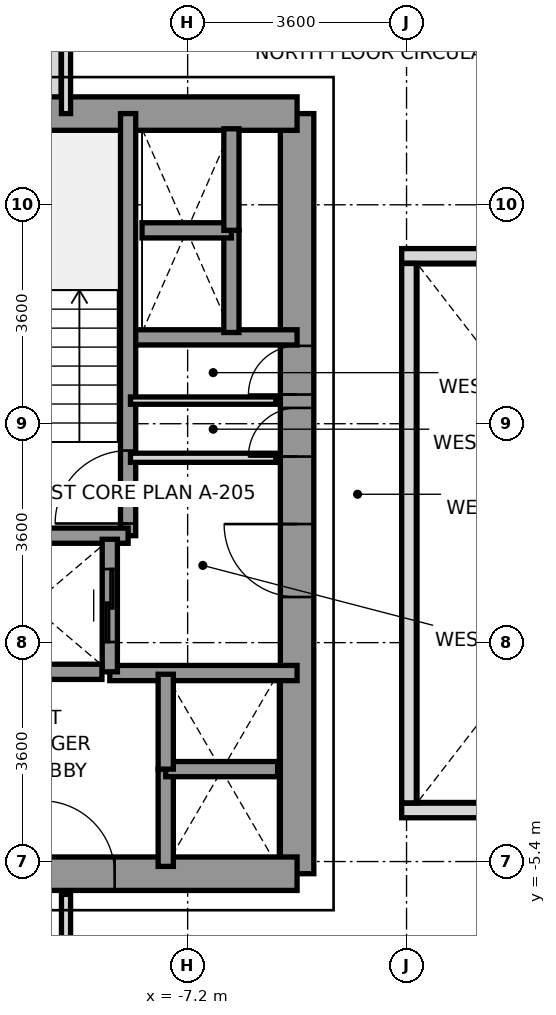
"""IFC4 building model, lengths in metres.
Left out: names, types, materials, properties, quantities, classifications, styles, units other than length and angle.
Written with IfcOpenShell. Run it as: python <this file> out.ifc"""

import sys

from ifc_helpers import new_model, si_unit, direction, frame, frame_2d, origin, place, context, subcontext, project, spatial, rectangle, extrude, source, transform, mapped, element, fill, save


model = new_model("IFC4")
c1 = context("Model", 3, precision=1e-05, world=origin(), true_north=direction((0.0, 1.0)))
c2 = subcontext(c1, "Body", "Model", "MODEL_VIEW")
j1 = project(units=[si_unit("LENGTHUNIT", "METRE"), si_unit("PLANEANGLEUNIT", "RADIAN")], contexts=[c1])
p1 = place(None, origin())
s1 = spatial("IfcSite", under=j1, at=p1, CompositionType="ELEMENT")
p2 = place(p1, origin())
s2 = spatial("IfcBuilding", under=s1, at=p2, CompositionType="ELEMENT")
p3 = place(p2, frame((0.0, 0.0, 40.8)))
s3 = spatial("IfcBuildingStorey", under=s2, at=p3, CompositionType="ELEMENT", Elevation=40.8)
p4 = place(p3, frame((-9.4, 6.953, 0.0), z_axis=(0.0, 0.0, 1.0), x_axis=(0.0, 1.0, 0.0)))
e1 = element("IfcWall", 1, at=p4, inside=s3, PredefinedType="PARAPET", context=c2, shape_type="SweptSolid", body=[
    extrude(rectangle(XDim=1.444, YDim=0.24, at=frame_2d((0.722, 0.0))), origin(), (0.0, 0.0, 1.0), 1.15),
])
p5 = place(p3, frame((-5.4, -5.6, 0.0), z_axis=(0.0, 0.0, 1.0), x_axis=(0.0, 1.0, 0.0)))
e2 = element("IfcWall", 2, at=p5, inside=s3, PredefinedType="SHEAR", context=c2, shape_type="SweptSolid", body=[
    extrude(rectangle(XDim=12.5, YDim=0.55, at=frame_2d((6.25, 0.0))), origin(), (0.0, 0.0, 1.0), 3.2),
])
p6 = place(p5, frame((4.55, 0.0, 0.0)))
e3 = element("IfcOpeningElement", 3, at=p6, cuts=e2, PredefinedType="OPENING", context=c2, shape_type="SweptSolid", body=[
    extrude(rectangle(XDim=1.2, YDim=2.2, at=frame_2d((0.6, 1.1))), frame((0.0, 0.285, 0.0), z_axis=(0.0, -1.0, 0.0), x_axis=(1.0, 0.0, 0.0)), (0.0, 0.0, 1.0), 0.57),
])
p7 = place(p5, frame((6.86, 0.0, 0.0)))
e4 = element("IfcOpeningElement", 4, at=p7, cuts=e2, PredefinedType="OPENING", context=c2, shape_type="SweptSolid", body=[
    extrude(rectangle(XDim=0.8, YDim=2.1, at=frame_2d((0.4, 1.05))), frame((0.0, 0.285, 0.0), z_axis=(0.0, -1.0, 0.0), x_axis=(1.0, 0.0, 0.0)), (0.0, 0.0, 1.0), 0.57),
])
p8 = place(p5, frame((7.88, 0.0, 0.0)))
e5 = element("IfcOpeningElement", 5, at=p8, cuts=e2, PredefinedType="OPENING", context=c2, shape_type="SweptSolid", body=[
    extrude(rectangle(XDim=0.8, YDim=2.1, at=frame_2d((0.4, 1.05))), frame((0.0, 0.285, 0.0), z_axis=(0.0, -1.0, 0.0), x_axis=(1.0, 0.0, 0.0)), (0.0, 0.0, 1.0), 0.57),
])
p9 = place(p3, frame((-11.381, 6.9, 0.0), z_axis=(0.0, 0.0, 1.0), x_axis=(1.0, 0.0, 0.0)))
e6 = element("IfcWall", 6, at=p9, inside=s3, PredefinedType="SHEAR", context=c2, shape_type="SweptSolid", body=[
    extrude(rectangle(XDim=5.981, YDim=0.55, at=frame_2d((2.991, 0.0))), origin(), (0.0, 0.0, 1.0), 3.2),
])
p10 = place(p3, frame((-13.2, -5.6, 0.0), z_axis=(0.0, 0.0, 1.0), x_axis=(1.0, 0.0, 0.0)))
e7 = element("IfcWall", 7, at=p10, inside=s3, PredefinedType="SHEAR", context=c2, shape_type="SweptSolid", body=[
    extrude(rectangle(XDim=7.8, YDim=0.55, at=frame_2d((3.9, 0.0))), origin(), (0.0, 0.0, 1.0), 3.2),
])
p11 = place(p10, frame((3.6, 0.0, 0.0)))
e8 = element("IfcOpeningElement", 8, at=p11, cuts=e7, PredefinedType="OPENING", context=c2, shape_type="SweptSolid", body=[
    extrude(rectangle(XDim=1.2, YDim=2.2, at=frame_2d((0.6, 1.1))), frame((0.0, 0.285, 0.0), z_axis=(0.0, -1.0, 0.0), x_axis=(1.0, 0.0, 0.0)), (0.0, 0.0, 1.0), 0.57),
])
p12 = place(p3, frame((-8.18, 3.22, 0.0), z_axis=(0.0, 0.0, 1.0), x_axis=(1.0, 0.0, 0.0)))
e9 = element("IfcWall", 9, at=p12, inside=s3, PredefinedType="SOLIDWALL", context=c2, shape_type="SweptSolid", body=[
    extrude(rectangle(XDim=2.78, YDim=0.25, at=frame_2d((1.39, 0.0))), origin(), (0.0, 0.0, 1.0), 3.2),
])
p13 = place(p3, frame((-8.48, -2.3, 0.0), z_axis=(0.0, 0.0, 1.0), x_axis=(1.0, 0.0, 0.0)))
e10 = element("IfcWall", 10, at=p13, inside=s3, PredefinedType="SOLIDWALL", context=c2, shape_type="SweptSolid", body=[
    extrude(rectangle(XDim=3.08, YDim=0.25, at=frame_2d((1.54, 0.0))), origin(), (0.0, 0.0, 1.0), 3.2),
])
p14 = place(p3, frame((-8.179, -0.041, 0.0), z_axis=(0.0, 0.0, 1.0), x_axis=(0.0, 1.0, 0.0)))
e11 = element("IfcWall", 11, at=p14, inside=s3, PredefinedType="SOLIDWALL", context=c2, shape_type="SweptSolid", body=[
    extrude(rectangle(XDim=6.941, YDim=0.25, at=frame_2d((3.47, 0.0))), origin(), (0.0, 0.0, 1.0), 3.2),
])
p15 = place(p14, frame((0.2, 0.0, 0.0)))
e12 = element("IfcOpeningElement", 12, at=p15, cuts=e11, PredefinedType="OPENING", context=c2, shape_type="SweptSolid", body=[
    extrude(rectangle(XDim=1.2, YDim=2.2, at=frame_2d((0.6, 1.1))), frame((0.0, 0.135, 0.0), z_axis=(0.0, -1.0, 0.0), x_axis=(1.0, 0.0, 0.0)), (0.0, 0.0, 1.0), 0.27),
])
p16 = place(p3, frame((-11.381, -0.041, 0.0), z_axis=(0.0, 0.0, 1.0), x_axis=(1.0, 0.0, 0.0)))
e13 = element("IfcWall", 13, at=p16, inside=s3, PredefinedType="SOLIDWALL", context=c2, shape_type="SweptSolid", body=[
    extrude(rectangle(XDim=3.202, YDim=0.25, at=frame_2d((1.601, 0.0))), origin(), (0.0, 0.0, 1.0), 3.2),
])
p17 = place(p3, frame((-8.48, -2.28, 0.0), z_axis=(0.0, 0.0, 1.0), x_axis=(0.0, 1.0, 0.0)))
e14 = element("IfcWall", 14, at=p17, inside=s3, PredefinedType="SOLIDWALL", context=c2, shape_type="SweptSolid", body=[
    extrude(rectangle(XDim=2.18, YDim=0.25, at=frame_2d((1.09, 0.0))), origin(), (0.0, 0.0, 1.0), 3.2),
])
p18 = place(p17, frame((0.49, 0.0, 0.0)))
e15 = element("IfcOpeningElement", 15, at=p18, cuts=e14, PredefinedType="OPENING", context=c2, shape_type="SweptSolid", body=[
    extrude(rectangle(XDim=1.2, YDim=2.2, at=frame_2d((0.6, 1.1))), frame((0.0, 0.135, 0.0), z_axis=(0.0, -1.0, 0.0), x_axis=(1.0, 0.0, 0.0)), (0.0, 0.0, 1.0), 0.27),
])
p19 = place(p3, frame((-10.921, -2.28, 0.0), z_axis=(0.0, 0.0, 1.0), x_axis=(1.0, 0.0, 0.0)))
e16 = element("IfcWall", 16, at=p19, inside=s3, PredefinedType="SOLIDWALL", context=c2, shape_type="SweptSolid", body=[
    extrude(rectangle(XDim=2.312, YDim=0.25, at=frame_2d((1.156, 0.0))), origin(), (0.0, 0.0, 1.0), 3.2),
])
p20 = place(p3, frame((-7.56, -5.48, 0.0), z_axis=(0.0, 0.0, 1.0), x_axis=(0.0, 1.0, 0.0)))
e17 = element("IfcWall", 17, at=p20, inside=s3, PredefinedType="SOLIDWALL", context=c2, shape_type="SweptSolid", body=[
    extrude(rectangle(XDim=1.6, YDim=0.25, at=frame_2d((0.8, 0.0))), origin(), (0.0, 0.0, 1.0), 3.2),
])
p21 = place(p3, frame((-7.56, -3.88, 0.0), z_axis=(0.0, 0.0, 1.0), x_axis=(1.0, 0.0, 0.0)))
e18 = element("IfcWall", 18, at=p21, inside=s3, PredefinedType="SOLIDWALL", context=c2, shape_type="SweptSolid", body=[
    extrude(rectangle(XDim=1.84, YDim=0.25, at=frame_2d((0.92, 0.0))), origin(), (0.0, 0.0, 1.0), 3.2),
])
p22 = place(p3, frame((-7.56, -3.88, 0.0), z_axis=(0.0, 0.0, 1.0), x_axis=(0.0, 1.0, 0.0)))
e19 = element("IfcWall", 19, at=p22, inside=s3, PredefinedType="SOLIDWALL", context=c2, shape_type="SweptSolid", body=[
    extrude(rectangle(XDim=1.56, YDim=0.25, at=frame_2d((0.78, 0.0))), origin(), (0.0, 0.0, 1.0), 3.2),
])
p23 = place(p3, frame((-6.48, 3.3, 0.0), z_axis=(0.0, 0.0, 1.0), x_axis=(0.0, 1.0, 0.0)))
e20 = element("IfcWall", 20, at=p23, inside=s3, PredefinedType="SOLIDWALL", context=c2, shape_type="SweptSolid", body=[
    extrude(rectangle(XDim=1.68, YDim=0.25, at=frame_2d((0.84, 0.0))), origin(), (0.0, 0.0, 1.0), 3.2),
])
p24 = place(p3, frame((-7.95, 4.98, 0.0), z_axis=(0.0, 0.0, 1.0), x_axis=(1.0, 0.0, 0.0)))
e21 = element("IfcWall", 21, at=p24, inside=s3, PredefinedType="SOLIDWALL", context=c2, shape_type="SweptSolid", body=[
    extrude(rectangle(XDim=1.47, YDim=0.25, at=frame_2d((0.735, 0.0))), origin(), (0.0, 0.0, 1.0), 3.2),
])
p25 = place(p3, frame((-6.48, 4.98, 0.0), z_axis=(0.0, 0.0, 1.0), x_axis=(0.0, 1.0, 0.0)))
e22 = element("IfcWall", 22, at=p25, inside=s3, PredefinedType="SOLIDWALL", context=c2, shape_type="SweptSolid", body=[
    extrude(rectangle(XDim=1.67, YDim=0.25, at=frame_2d((0.835, 0.0))), origin(), (0.0, 0.0, 1.0), 3.2),
])
p26 = place(p3, frame((-8.14, 1.24, 0.0), z_axis=(0.0, 0.0, 1.0), x_axis=(1.0, 0.0, 0.0)))
e23 = element("IfcWall", 23, at=p26, inside=s3, PredefinedType="PARTITIONING", context=c2, shape_type="SweptSolid", body=[
    extrude(rectangle(XDim=2.39, YDim=0.15, at=frame_2d((1.195, 0.0))), origin(), (0.0, 0.0, 1.0), 2.3),
])
p27 = place(p3, frame((-8.14, 2.18, 0.0), z_axis=(0.0, 0.0, 1.0), x_axis=(1.0, 0.0, 0.0)))
e24 = element("IfcWall", 24, at=p27, inside=s3, PredefinedType="PARTITIONING", context=c2, shape_type="SweptSolid", body=[
    extrude(rectangle(XDim=2.39, YDim=0.12, at=frame_2d((1.195, 0.0))), origin(), (0.0, 0.0, 1.0), 2.3),
])
p28 = place(p3, frame((-9.2, 6.9, 0.0), z_axis=(0.0, 0.0, 1.0), x_axis=(0.0, 1.0, 0.0)))
e25 = element("IfcWall", 25, at=p28, inside=s3, PredefinedType="PARTITIONING", context=c2, shape_type="SweptSolid", body=[
    extrude(rectangle(XDim=8.78, YDim=0.15, at=frame_2d((4.39, 0.0))), origin(), (0.0, 0.0, 1.0), 2.71),
])
p29 = place(p3, frame((-9.2, -15.68, 0.0), z_axis=(0.0, 0.0, 1.0), x_axis=(0.0, 1.0, 0.0)))
e26 = element("IfcWall", 26, at=p29, inside=s3, PredefinedType="PARTITIONING", context=c2, shape_type="SweptSolid", body=[
    extrude(rectangle(XDim=9.74, YDim=0.15, at=frame_2d((4.87, 0.0))), origin(), (0.0, 0.0, 1.0), 2.71),
])
for number, where, z_axis, x_axis in (
    (27, (-3.68, -4.56, 0.0), (0.0, 0.0, 1.0), (1.0, 0.0, 0.0)),
    (28, (-3.68, 4.56, 0.0), (0.0, 0.0, 1.0), (1.0, 0.0, 0.0)),
):
    element("IfcWall", number, at=place(p3, frame(where, z_axis=z_axis, x_axis=x_axis)), inside=s3, PredefinedType="PARAPET", context=c2, shape_type="SweptSolid", body=[
        extrude(rectangle(XDim=7.36, YDim=0.24, at=frame_2d((3.68, 0.0))), origin(), (0.0, 0.0, 1.0), 1.15),
    ])
p30 = place(p3, frame((-3.56, -4.435, 0.0), z_axis=(0.0, 0.0, 1.0), x_axis=(0.0, 1.0, 0.0)))
e29 = element("IfcWall", 29, at=p30, inside=s3, PredefinedType="PARAPET", context=c2, shape_type="SweptSolid", body=[
    extrude(rectangle(XDim=8.87, YDim=0.24, at=frame_2d((4.435, 0.0))), origin(), (0.0, 0.0, 1.0), 1.15),
])
m1 = source(origin(), c2, "Body", "SweptSolid", [
    extrude(rectangle(XDim=1.2, YDim=2.2, at=frame_2d((0.6, 1.1))), frame((0.0, 0.025, 0.0), z_axis=(0.0, -1.0, 0.0), x_axis=(1.0, 0.0, 0.0)), (0.0, 0.0, 1.0), 0.05),
])
p31 = place(p15, origin())
e30 = element("IfcDoor", 30, at=p31, inside=s3, OperationType="SINGLE_SWING_LEFT", PredefinedType="DOOR", context=c2, shape_type="MappedRepresentation", body=[
    mapped(m1, transform((0.0, 0.0, 0.0), x_axis=(1.0, 0.0, 0.0), y_axis=(0.0, 1.0, 0.0), z_axis=(0.0, 0.0, 1.0), scale=1.0)),
])
fill(e12, e30)
p32 = place(p6, origin())
e31 = element("IfcDoor", 31, at=p32, inside=s3, OperationType="SINGLE_SWING_RIGHT", PredefinedType="DOOR", context=c2, shape_type="MappedRepresentation", body=[
    mapped(m1, transform((0.0, 0.0, 0.0), x_axis=(1.0, 0.0, 0.0), y_axis=(0.0, 1.0, 0.0), z_axis=(0.0, 0.0, 1.0), scale=1.0)),
])
fill(e3, e31)
p33 = place(p11, origin())
e32 = element("IfcDoor", 32, at=p33, inside=s3, OperationType="SINGLE_SWING_LEFT", PredefinedType="DOOR", context=c2, shape_type="MappedRepresentation", body=[
    mapped(m1, transform((0.0, 0.0, 0.0), x_axis=(1.0, 0.0, 0.0), y_axis=(0.0, 1.0, 0.0), z_axis=(0.0, 0.0, 1.0), scale=1.0)),
])
fill(e8, e32)
m2 = source(origin(), c2, "Body", "SweptSolid", [
    extrude(rectangle(XDim=0.8, YDim=2.1, at=frame_2d((0.4, 1.05))), frame((0.0, 0.025, 0.0), z_axis=(0.0, -1.0, 0.0), x_axis=(1.0, 0.0, 0.0)), (0.0, 0.0, 1.0), 0.05),
])
p34 = place(p7, origin())
e33 = element("IfcDoor", 33, at=p34, inside=s3, OperationType="SINGLE_SWING_LEFT", PredefinedType="DOOR", context=c2, shape_type="MappedRepresentation", body=[
    mapped(m2, transform((0.0, 0.0, 0.0), x_axis=(1.0, 0.0, 0.0), y_axis=(0.0, 1.0, 0.0), z_axis=(0.0, 0.0, 1.0), scale=1.0)),
])
fill(e4, e33)
p35 = place(p8, origin())
e34 = element("IfcDoor", 34, at=p35, inside=s3, OperationType="SINGLE_SWING_LEFT", PredefinedType="DOOR", context=c2, shape_type="MappedRepresentation", body=[
    mapped(m2, transform((0.0, 0.0, 0.0), x_axis=(1.0, 0.0, 0.0), y_axis=(0.0, 1.0, 0.0), z_axis=(0.0, 0.0, 1.0), scale=1.0)),
])
fill(e5, e34)
p36 = place(p18, origin())
e35 = element("IfcDoor", 35, at=p36, inside=s3, OperationType="SLIDING_TO_RIGHT", PredefinedType="DOOR", context=c2, shape_type="MappedRepresentation", body=[
    mapped(m1, transform((0.0, 0.0, 0.0), x_axis=(1.0, 0.0, 0.0), y_axis=(0.0, 1.0, 0.0), z_axis=(0.0, 0.0, 1.0), scale=1.0)),
])
fill(e15, e35)
save(model, sys.argv[1])
